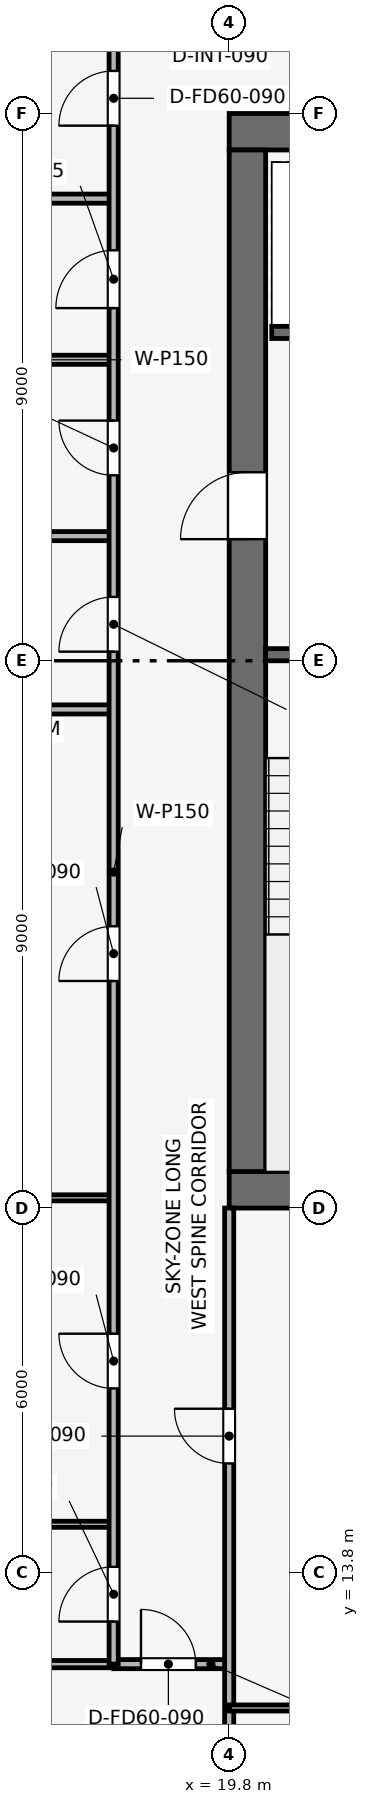
"""IFC4 building model, lengths in metres.
Left out: names, types, materials, properties, quantities, classifications, styles, units other than length and angle.
Written with IfcOpenShell. Run it as: python <this file> out.ifc"""

import sys

from ifc_helpers import new_model, si_unit, direction, frame, frame_2d, origin, place, context, subcontext, project, spatial, rectangle, extrude, element, fill, save


model = new_model("IFC4")
c1 = context("Model", 3, precision=1e-05, world=origin(), true_north=direction((0.0, 1.0)))
c2 = subcontext(c1, "Body", "Model", "MODEL_VIEW")
j1 = project(units=[si_unit("LENGTHUNIT", "METRE"), si_unit("PLANEANGLEUNIT", "RADIAN")], contexts=[c1])
p1 = place(None, origin())
s1 = spatial("IfcSite", under=j1, at=p1, CompositionType="ELEMENT")
p2 = place(p1, origin())
s2 = spatial("IfcBuilding", under=s1, at=p2, CompositionType="ELEMENT")
p3 = place(p2, frame((0.0, 0.0, 306.75)))
s3 = spatial("IfcBuildingStorey", under=s2, at=p3, CompositionType="ELEMENT", Elevation=306.75)
p4 = place(p3, frame((19.8, 20.1, 0.0), z_axis=(0.0, 0.0, 1.0), x_axis=(1.0, 0.0, 0.0)))
e1 = element("IfcWall", 1, at=p4, inside=s3, PredefinedType="SHEAR", context=c2, shape_type="SweptSolid", body=[
    extrude(rectangle(XDim=18.0, YDim=0.6, at=frame_2d((9.0, 0.0))), origin(), (0.0, 0.0, 1.0), 3.75),
])
p5 = place(p3, frame((19.8, 37.5, 0.0), z_axis=(0.0, 0.0, 1.0), x_axis=(1.0, 0.0, 0.0)))
e2 = element("IfcWall", 2, at=p5, inside=s3, PredefinedType="SHEAR", context=c2, shape_type="SweptSolid", body=[
    extrude(rectangle(XDim=18.0, YDim=0.6, at=frame_2d((9.0, 0.0))), origin(), (0.0, 0.0, 1.0), 3.75),
])
p6 = place(p5, frame((7.05, 0.0, 0.0)))
e3 = element("IfcOpeningElement", 3, at=p6, cuts=e2, PredefinedType="OPENING", context=c2, shape_type="SweptSolid", body=[
    extrude(rectangle(XDim=1.1, YDim=2.15, at=frame_2d((0.55, 1.075))), frame((0.0, 0.31, 0.0), z_axis=(0.0, -1.0, 0.0), x_axis=(1.0, 0.0, 0.0)), (0.0, 0.0, 1.0), 0.62),
])
p7 = place(p3, frame((20.1, 20.4, 0.0), z_axis=(0.0, 0.0, 1.0), x_axis=(0.0, 1.0, 0.0)))
e4 = element("IfcWall", 4, at=p7, inside=s3, PredefinedType="SHEAR", context=c2, shape_type="SweptSolid", body=[
    extrude(rectangle(XDim=16.8, YDim=0.6, at=frame_2d((8.4, 0.0))), origin(), (0.0, 0.0, 1.0), 3.75),
])
p8 = place(p7, frame((10.4, 0.0, 0.0)))
e5 = element("IfcOpeningElement", 5, at=p8, cuts=e4, PredefinedType="OPENING", context=c2, shape_type="SweptSolid", body=[
    extrude(rectangle(XDim=1.1, YDim=2.15, at=frame_2d((0.55, 1.075))), frame((0.0, 0.31, 0.0), z_axis=(0.0, -1.0, 0.0), x_axis=(1.0, 0.0, 0.0)), (0.0, 0.0, 1.0), 0.62),
])
p9 = place(p3, frame((20.4, 28.9, 0.0), z_axis=(0.0, 0.0, 1.0), x_axis=(1.0, 0.0, 0.0)))
e6 = element("IfcWall", 6, at=p9, inside=s3, PredefinedType="SHEAR", context=c2, shape_type="SweptSolid", body=[
    extrude(rectangle(XDim=3.15, YDim=0.2, at=frame_2d((1.575, 0.0))), origin(), (0.0, 0.0, 1.0), 3.51),
])
p10 = place(p9, frame((0.8, 0.0, 0.0)))
e7 = element("IfcOpeningElement", 7, at=p10, cuts=e6, PredefinedType="OPENING", context=c2, shape_type="SweptSolid", body=[
    extrude(rectangle(XDim=1.0, YDim=2.1, at=frame_2d((0.5, 1.05))), frame((0.0, 0.11, 0.0), z_axis=(0.0, -1.0, 0.0), x_axis=(1.0, 0.0, 0.0)), (0.0, 0.0, 1.0), 0.22),
])
p11 = place(p3, frame((20.5, 34.2, 0.0), z_axis=(0.0, 0.0, 1.0), x_axis=(1.0, 0.0, 0.0)))
e8 = element("IfcWall", 8, at=p11, inside=s3, PredefinedType="SHEAR", context=c2, shape_type="SweptSolid", body=[
    extrude(rectangle(XDim=3.05, YDim=0.2, at=frame_2d((1.525, 0.0))), origin(), (0.0, 0.0, 1.0), 3.51),
])
p12 = place(p11, frame((0.75, 0.0, 0.0)))
e9 = element("IfcOpeningElement", 9, at=p12, cuts=e8, PredefinedType="OPENING", context=c2, shape_type="SweptSolid", body=[
    extrude(rectangle(XDim=1.1, YDim=2.15, at=frame_2d((0.55, 1.075))), frame((0.0, 0.11, 0.0), z_axis=(0.0, -1.0, 0.0), x_axis=(1.0, 0.0, 0.0)), (0.0, 0.0, 1.0), 0.22),
])
p13 = place(p3, frame((6.13, 28.0, 0.0), z_axis=(0.0, 0.0, 1.0), x_axis=(1.0, 0.0, 0.0)))
e10 = element("IfcWall", 10, at=p13, inside=s3, PredefinedType="PARTITIONING", context=c2, shape_type="SweptSolid", body=[
    extrude(rectangle(XDim=11.77, YDim=0.15, at=frame_2d((5.885, 0.0))), origin(), (0.0, 0.0, 1.0), 3.135),
])
for number, where, z_axis, x_axis in (
    (11, (14.8, 36.4, 0.0), (0.0, 0.0, 1.0), (1.0, 0.0, 0.0)),
    (12, (14.8, 30.85, 0.0), (0.0, 0.0, 1.0), (1.0, 0.0, 0.0)),
    (13, (14.8, 33.75, 0.0), (0.0, 0.0, 1.0), (1.0, 0.0, 0.0)),
):
    element("IfcWall", number, at=place(p3, frame(where, z_axis=z_axis, x_axis=x_axis)), inside=s3, PredefinedType="PARTITIONING", context=c2, shape_type="SweptSolid", body=[
        extrude(rectangle(XDim=3.1, YDim=0.15, at=frame_2d((1.55, 0.0))), origin(), (0.0, 0.0, 1.0), 3.135),
    ])
p14 = place(p3, frame((6.13, 14.6, 0.0), z_axis=(0.0, 0.0, 1.0), x_axis=(1.0, 0.0, 0.0)))
e14 = element("IfcWall", 14, at=p14, inside=s3, PredefinedType="MOVABLE", context=c2, shape_type="SweptSolid", body=[
    extrude(rectangle(XDim=11.77, YDim=0.1, at=frame_2d((5.885, 0.0))), origin(), (0.0, 0.0, 1.0), 3.095),
])
p15 = place(p3, frame((6.13, 19.968, 0.0), z_axis=(0.0, 0.0, 1.0), x_axis=(1.0, 0.0, 0.0)))
e15 = element("IfcWall", 15, at=p15, inside=s3, PredefinedType="MOVABLE", context=c2, shape_type="SweptSolid", body=[
    extrude(rectangle(XDim=11.77, YDim=0.1, at=frame_2d((5.885, 0.0))), origin(), (0.0, 0.0, 1.0), 3.195),
])
p16 = place(p3, frame((12.3, 12.3, 0.0), z_axis=(0.0, 0.0, 1.0), x_axis=(1.0, 0.0, 0.0)))
e16 = element("IfcWall", 16, at=p16, inside=s3, PredefinedType="PARTITIONING", context=c2, shape_type="SweptSolid", body=[
    extrude(rectangle(XDim=5.6, YDim=0.12, at=frame_2d((2.8, 0.0))), origin(), (0.0, 0.0, 1.0), 3.195),
])
p17 = place(p3, frame((17.9, 12.3, 0.0), z_axis=(0.0, 0.0, 1.0), x_axis=(1.0, 0.0, 0.0)))
e17 = element("IfcWall", 17, at=p17, inside=s3, PredefinedType="PARTITIONING", context=c2, shape_type="SweptSolid", body=[
    extrude(rectangle(XDim=1.9, YDim=0.15, at=frame_2d((0.95, 0.0))), origin(), (0.0, 0.0, 1.0), 3.51),
])
p18 = place(p17, frame((0.45, 0.0, 0.0)))
e18 = element("IfcOpeningElement", 18, at=p18, cuts=e17, PredefinedType="OPENING", context=c2, shape_type="SweptSolid", body=[
    extrude(rectangle(XDim=0.9, YDim=2.1, at=frame_2d((0.45, 1.05))), frame((0.0, 0.085, 0.0), z_axis=(0.0, -1.0, 0.0), x_axis=(1.0, 0.0, 0.0)), (0.0, 0.0, 1.0), 0.17),
])
p19 = place(p3, frame((19.8, 6.13, 0.0), z_axis=(0.0, 0.0, 1.0), x_axis=(0.0, 1.0, 0.0)))
e19 = element("IfcWall", 19, at=p19, inside=s3, PredefinedType="PARTITIONING", context=c2, shape_type="SweptSolid", body=[
    extrude(rectangle(XDim=13.67, YDim=0.15, at=frame_2d((6.835, 0.0))), origin(), (0.0, 0.0, 1.0), 3.095),
])
p20 = place(p19, frame((9.47, 0.0, 0.0)))
e20 = element("IfcOpeningElement", 20, at=p20, cuts=e19, PredefinedType="OPENING", context=c2, shape_type="SweptSolid", body=[
    extrude(rectangle(XDim=0.9, YDim=2.1, at=frame_2d((0.45, 1.05))), frame((0.0, 0.085, 0.0), z_axis=(0.0, -1.0, 0.0), x_axis=(1.0, 0.0, 0.0)), (0.0, 0.0, 1.0), 0.17),
])
p21 = place(p3, frame((19.8, 11.579, 0.0), z_axis=(0.0, 0.0, 1.0), x_axis=(1.0, 0.0, 0.0)))
e21 = element("IfcWall", 21, at=p21, inside=s3, PredefinedType="MOVABLE", context=c2, shape_type="SweptSolid", body=[
    extrude(rectangle(XDim=2.509, YDim=0.1, at=frame_2d((1.254, 0.0))), origin(), (0.0, 0.0, 1.0), 3.095),
])
p22 = place(p21, frame((1.409, 0.0, 0.0)))
e22 = element("IfcOpeningElement", 22, at=p22, cuts=e21, PredefinedType="OPENING", context=c2, shape_type="SweptSolid", body=[
    extrude(rectangle(XDim=0.9, YDim=2.1, at=frame_2d((0.45, 1.05))), frame((0.0, 0.06, 0.0), z_axis=(0.0, -1.0, 0.0), x_axis=(1.0, 0.0, 0.0)), (0.0, 0.0, 1.0), 0.12),
])
p23 = place(p3, frame((17.9, 12.3, 0.0), z_axis=(0.0, 0.0, 1.0), x_axis=(0.0, 1.0, 0.0)))
e23 = element("IfcWall", 23, at=p23, inside=s3, PredefinedType="PARTITIONING", context=c2, shape_type="SweptSolid", body=[
    extrude(rectangle(XDim=27.4, YDim=0.15, at=frame_2d((13.7, 0.0))), origin(), (0.0, 0.0, 1.0), 3.095),
])
p24 = place(p23, frame((0.7, 0.0, 0.0)))
e24 = element("IfcOpeningElement", 24, at=p24, cuts=e23, PredefinedType="OPENING", context=c2, shape_type="SweptSolid", body=[
    extrude(rectangle(XDim=0.9, YDim=2.1, at=frame_2d((0.45, 1.05))), frame((0.0, 0.085, 0.0), z_axis=(0.0, -1.0, 0.0), x_axis=(1.0, 0.0, 0.0)), (0.0, 0.0, 1.0), 0.17),
])
p25 = place(p23, frame((4.534, 0.0, 0.0)))
e25 = element("IfcOpeningElement", 25, at=p25, cuts=e23, PredefinedType="OPENING", context=c2, shape_type="SweptSolid", body=[
    extrude(rectangle(XDim=0.9, YDim=2.1, at=frame_2d((0.45, 1.05))), frame((0.0, 0.085, 0.0), z_axis=(0.0, -1.0, 0.0), x_axis=(1.0, 0.0, 0.0)), (0.0, 0.0, 1.0), 0.17),
])
p26 = place(p23, frame((11.234, 0.0, 0.0)))
e26 = element("IfcOpeningElement", 26, at=p26, cuts=e23, PredefinedType="OPENING", context=c2, shape_type="SweptSolid", body=[
    extrude(rectangle(XDim=0.9, YDim=2.1, at=frame_2d((0.45, 1.05))), frame((0.0, 0.085, 0.0), z_axis=(0.0, -1.0, 0.0), x_axis=(1.0, 0.0, 0.0)), (0.0, 0.0, 1.0), 0.17),
])
p27 = place(p23, frame((16.65, 0.0, 0.0)))
e27 = element("IfcOpeningElement", 27, at=p27, cuts=e23, PredefinedType="OPENING", context=c2, shape_type="SweptSolid", body=[
    extrude(rectangle(XDim=0.9, YDim=2.1, at=frame_2d((0.45, 1.05))), frame((0.0, 0.085, 0.0), z_axis=(0.0, -1.0, 0.0), x_axis=(1.0, 0.0, 0.0)), (0.0, 0.0, 1.0), 0.17),
])
p28 = place(p23, frame((19.55, 0.0, 0.0)))
e28 = element("IfcOpeningElement", 28, at=p28, cuts=e23, PredefinedType="OPENING", context=c2, shape_type="SweptSolid", body=[
    extrude(rectangle(XDim=0.9, YDim=2.1, at=frame_2d((0.45, 1.05))), frame((0.0, 0.085, 0.0), z_axis=(0.0, -1.0, 0.0), x_axis=(1.0, 0.0, 0.0)), (0.0, 0.0, 1.0), 0.17),
])
p29 = place(p23, frame((22.3, 0.0, 0.0)))
e29 = element("IfcOpeningElement", 29, at=p29, cuts=e23, PredefinedType="OPENING", context=c2, shape_type="SweptSolid", body=[
    extrude(rectangle(XDim=0.95, YDim=2.1, at=frame_2d((0.475, 1.05))), frame((0.0, 0.085, 0.0), z_axis=(0.0, -1.0, 0.0), x_axis=(1.0, 0.0, 0.0)), (0.0, 0.0, 1.0), 0.17),
])
p30 = place(p23, frame((25.3, 0.0, 0.0)))
e30 = element("IfcOpeningElement", 30, at=p30, cuts=e23, PredefinedType="OPENING", context=c2, shape_type="SweptSolid", body=[
    extrude(rectangle(XDim=0.9, YDim=2.1, at=frame_2d((0.45, 1.05))), frame((0.0, 0.085, 0.0), z_axis=(0.0, -1.0, 0.0), x_axis=(1.0, 0.0, 0.0)), (0.0, 0.0, 1.0), 0.17),
])
p31 = place(p18, origin())
e31 = element("IfcDoor", 31, at=p31, inside=s3, OperationType="SINGLE_SWING_LEFT", PredefinedType="DOOR", context=c2, shape_type="SweptSolid", body=[
    extrude(rectangle(XDim=0.9, YDim=2.1, at=frame_2d((0.45, 1.05))), frame((0.0, 0.025, 0.0), z_axis=(0.0, -1.0, 0.0), x_axis=(1.0, 0.0, 0.0)), (0.0, 0.0, 1.0), 0.05),
])
fill(e18, e31)
p32 = place(p20, origin())
e32 = element("IfcDoor", 32, at=p32, inside=s3, OperationType="SINGLE_SWING_RIGHT", PredefinedType="DOOR", context=c2, shape_type="SweptSolid", body=[
    extrude(rectangle(XDim=0.9, YDim=2.1, at=frame_2d((0.45, 1.05))), frame((0.0, 0.025, 0.0), z_axis=(0.0, -1.0, 0.0), x_axis=(1.0, 0.0, 0.0)), (0.0, 0.0, 1.0), 0.05),
])
fill(e20, e32)
p33 = place(p24, origin())
e33 = element("IfcDoor", 33, at=p33, inside=s3, OperationType="SINGLE_SWING_LEFT", PredefinedType="DOOR", context=c2, shape_type="SweptSolid", body=[
    extrude(rectangle(XDim=0.9, YDim=2.1, at=frame_2d((0.45, 1.05))), frame((0.0, 0.025, 0.0), z_axis=(0.0, -1.0, 0.0), x_axis=(1.0, 0.0, 0.0)), (0.0, 0.0, 1.0), 0.05),
])
fill(e24, e33)
p34 = place(p25, origin())
e34 = element("IfcDoor", 34, at=p34, inside=s3, OperationType="SINGLE_SWING_RIGHT", PredefinedType="DOOR", context=c2, shape_type="SweptSolid", body=[
    extrude(rectangle(XDim=0.9, YDim=2.1, at=frame_2d((0.45, 1.05))), frame((0.0, 0.025, 0.0), z_axis=(0.0, -1.0, 0.0), x_axis=(1.0, 0.0, 0.0)), (0.0, 0.0, 1.0), 0.05),
])
fill(e25, e34)
p35 = place(p26, origin())
e35 = element("IfcDoor", 35, at=p35, inside=s3, OperationType="SINGLE_SWING_LEFT", PredefinedType="DOOR", context=c2, shape_type="SweptSolid", body=[
    extrude(rectangle(XDim=0.9, YDim=2.1, at=frame_2d((0.45, 1.05))), frame((0.0, 0.025, 0.0), z_axis=(0.0, -1.0, 0.0), x_axis=(1.0, 0.0, 0.0)), (0.0, 0.0, 1.0), 0.05),
])
fill(e26, e35)
p36 = place(p27, origin())
e36 = element("IfcDoor", 36, at=p36, inside=s3, OperationType="SINGLE_SWING_LEFT", PredefinedType="DOOR", context=c2, shape_type="SweptSolid", body=[
    extrude(rectangle(XDim=0.9, YDim=2.1, at=frame_2d((0.45, 1.05))), frame((0.0, 0.025, 0.0), z_axis=(0.0, -1.0, 0.0), x_axis=(1.0, 0.0, 0.0)), (0.0, 0.0, 1.0), 0.05),
])
fill(e27, e36)
p37 = place(p28, origin())
e37 = element("IfcDoor", 37, at=p37, inside=s3, OperationType="SINGLE_SWING_RIGHT", PredefinedType="DOOR", context=c2, shape_type="SweptSolid", body=[
    extrude(rectangle(XDim=0.9, YDim=2.1, at=frame_2d((0.45, 1.05))), frame((0.0, 0.025, 0.0), z_axis=(0.0, -1.0, 0.0), x_axis=(1.0, 0.0, 0.0)), (0.0, 0.0, 1.0), 0.05),
])
fill(e28, e37)
p38 = place(p29, origin())
e38 = element("IfcDoor", 38, at=p38, inside=s3, OperationType="SINGLE_SWING_LEFT", PredefinedType="DOOR", context=c2, shape_type="SweptSolid", body=[
    extrude(rectangle(XDim=0.95, YDim=2.1, at=frame_2d((0.475, 1.05))), frame((0.0, 0.025, 0.0), z_axis=(0.0, -1.0, 0.0), x_axis=(1.0, 0.0, 0.0)), (0.0, 0.0, 1.0), 0.05),
])
fill(e29, e38)
p39 = place(p30, origin())
e39 = element("IfcDoor", 39, at=p39, inside=s3, OperationType="SINGLE_SWING_LEFT", PredefinedType="DOOR", context=c2, shape_type="SweptSolid", body=[
    extrude(rectangle(XDim=0.9, YDim=2.1, at=frame_2d((0.45, 1.05))), frame((0.0, 0.025, 0.0), z_axis=(0.0, -1.0, 0.0), x_axis=(1.0, 0.0, 0.0)), (0.0, 0.0, 1.0), 0.05),
])
fill(e30, e39)
p40 = place(p8, origin())
e40 = element("IfcDoor", 40, at=p40, inside=s3, OperationType="SINGLE_SWING_LEFT", PredefinedType="DOOR", context=c2, shape_type="SweptSolid", body=[
    extrude(rectangle(XDim=1.1, YDim=2.15, at=frame_2d((0.55, 1.075))), frame((0.0, 0.025, 0.0), z_axis=(0.0, -1.0, 0.0), x_axis=(1.0, 0.0, 0.0)), (0.0, 0.0, 1.0), 0.05),
])
fill(e5, e40)
save(model, sys.argv[1])
